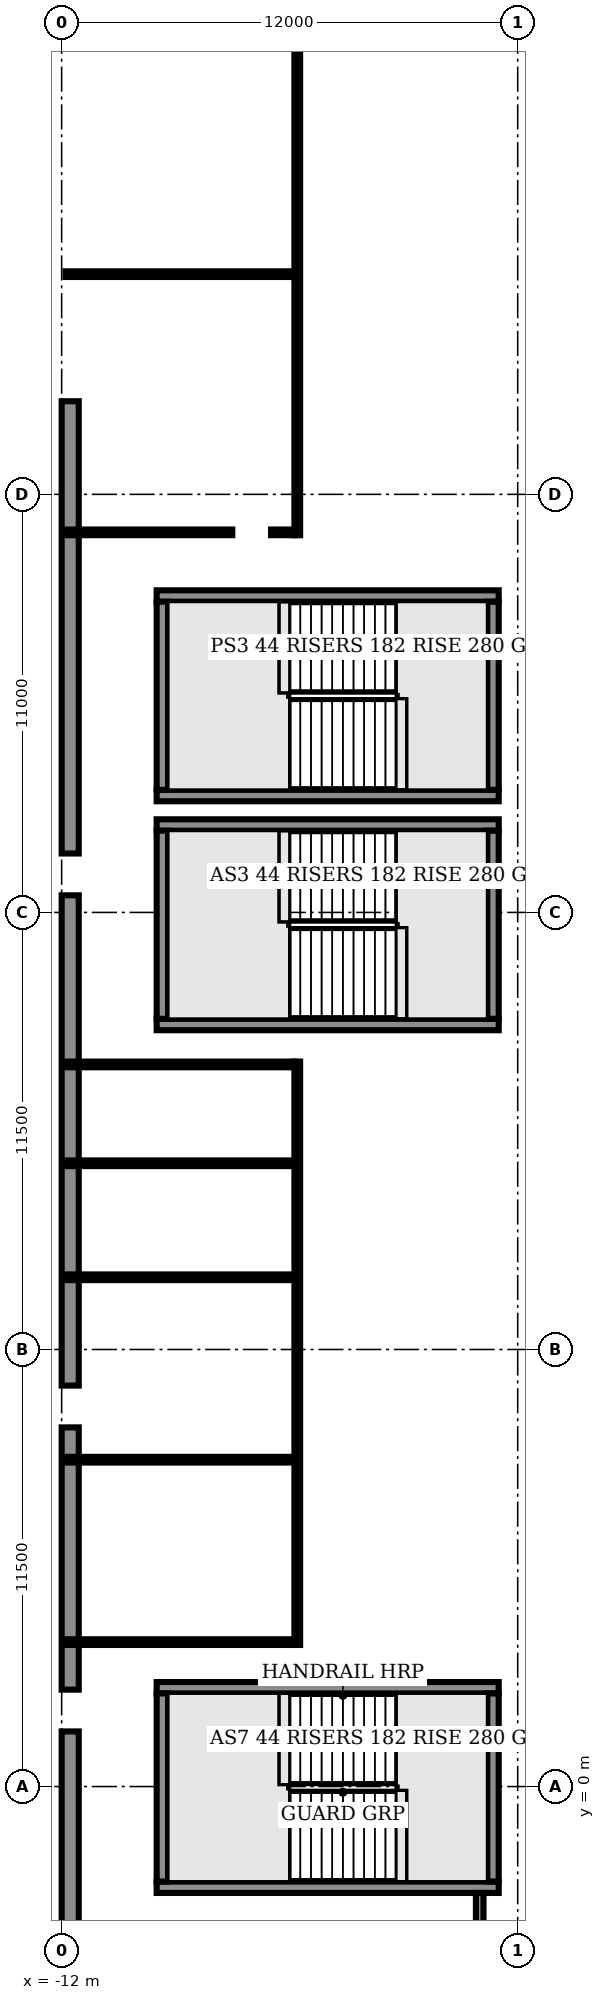
"""IFC4 building model, lengths in metres.
Left out: names, types, materials, properties, quantities, classifications, styles, units other than length and angle.
Written with IfcOpenShell. Run it as: python <this file> out.ifc"""

import sys

from ifc_helpers import new_model, si_unit, direction, frame, frame_2d, origin, origin_2d, place, context, subcontext, project, spatial, rectangle, extrude, element, fill, save


model = new_model("IFC4")
c1 = context("Model", 3, precision=1e-05, world=origin(), true_north=direction((0.0, 1.0)))
c2 = subcontext(c1, "Body", "Model", "MODEL_VIEW")
j1 = project(units=[si_unit("LENGTHUNIT", "METRE"), si_unit("PLANEANGLEUNIT", "RADIAN")], contexts=[c1])
p1 = place(None, origin())
s1 = spatial("IfcSite", under=j1, at=p1, CompositionType="ELEMENT")
p2 = place(p1, origin())
s2 = spatial("IfcBuilding", under=s1, at=p2, CompositionType="ELEMENT")
p3 = place(p2, origin())
s3 = spatial("IfcBuildingStorey", under=s2, at=p3, CompositionType="ELEMENT", Elevation=0.0)
for number, where, z_axis, x_axis in (
    (1, (0.685, 41.034, 0.0), (0.0, 0.0, 1.0), (1.0, 0.0, 0.0)),
    (2, (0.66, 30.0, 0.0), (0.0, 0.0, 1.0), (1.0, 0.0, 0.0)),
    (3, (0.66, 18.0, 0.0), (0.0, 0.0, 1.0), (1.0, 0.0, 0.0)),
):
    element("IfcColumn", number, at=place(p3, frame(where, z_axis=z_axis, x_axis=x_axis)), inside=s3, PredefinedType="COLUMN", context=c2, shape_type="SweptSolid", body=[
        extrude(rectangle(XDim=1.32, YDim=1.32, at=origin_2d()), origin(), (0.0, 0.0, 1.0), 8.0),
    ])
for number, where, z_axis, x_axis in (
    (4, (-11.0, 10.0, 0.0), (0.0, 0.0, 1.0), (1.0, 0.0, 0.0)),
    (5, (-11.0, 24.0, 0.0), (0.0, 0.0, 1.0), (1.0, 0.0, 0.0)),
    (6, (-11.0, 37.0, 0.0), (0.0, 0.0, 1.0), (1.0, 0.0, 0.0)),
    (7, (-11.0, 46.0, 0.0), (0.0, 0.0, 1.0), (1.0, 0.0, 0.0)),
    (8, (-11.0, 2.0, 0.0), (0.0, 0.0, 1.0), (1.0, 0.0, 0.0)),
    (9, (-7.0, 17.0, 0.0), (0.0, 0.0, 1.0), (1.0, 0.0, 0.0)),
    (10, (-7.0, 33.0, 0.0), (0.0, 0.0, 1.0), (1.0, 0.0, 0.0)),
    (11, (-5.0, 6.0, 0.0), (0.0, 0.0, 1.0), (1.0, 0.0, 0.0)),
):
    element("IfcColumn", number, at=place(p3, frame(where, z_axis=z_axis, x_axis=x_axis)), inside=s3, PredefinedType="COLUMN", context=c2, shape_type="SweptSolid", body=[
        extrude(rectangle(XDim=1.0, YDim=1.0, at=origin_2d()), origin(), (0.0, 0.0, 1.0), 8.0),
    ])
p4 = place(p3, frame((-11.775, 45.45, 0.0), z_axis=(0.0, 0.0, 1.0), x_axis=(0.0, -1.0, 0.0)))
e12 = element("IfcWall", 12, at=p4, inside=s3, PredefinedType="SOLIDWALL", context=c2, shape_type="SweptSolid", body=[
    extrude(rectangle(XDim=7.9, YDim=0.45, at=frame_2d((3.95, 0.0))), origin(), (0.0, 0.0, 1.0), 7.7),
])
p5 = place(p3, frame((-11.775, 36.45, 0.0), z_axis=(0.0, 0.0, 1.0), x_axis=(0.0, -1.0, 0.0)))
e13 = element("IfcWall", 13, at=p5, inside=s3, PredefinedType="SOLIDWALL", context=c2, shape_type="SweptSolid", body=[
    extrude(rectangle(XDim=11.9, YDim=0.45, at=frame_2d((5.95, 0.0))), origin(), (0.0, 0.0, 1.0), 7.7),
])
p6 = place(p5, frame((3.85, 0.0, 0.0)))
e14 = element("IfcOpeningElement", 14, at=p6, cuts=e13, PredefinedType="OPENING", context=c2, shape_type="SweptSolid", body=[
    extrude(rectangle(XDim=2.4, YDim=2.4, at=frame_2d((1.2, 1.2))), frame((0.0, 0.235, 0.0), z_axis=(0.0, -1.0, 0.0), x_axis=(1.0, 0.0, 0.0)), (0.0, 0.0, 1.0), 0.47),
])
p7 = place(p5, frame((6.95, 0.0, 0.0)))
e15 = element("IfcOpeningElement", 15, at=p7, cuts=e13, PredefinedType="OPENING", context=c2, shape_type="SweptSolid", body=[
    extrude(rectangle(XDim=2.4, YDim=2.4, at=frame_2d((1.2, 1.2))), frame((0.0, 0.235, 0.0), z_axis=(0.0, -1.0, 0.0), x_axis=(1.0, 0.0, 0.0)), (0.0, 0.0, 1.0), 0.47),
])
p8 = place(p3, frame((-11.775, 23.45, 0.0), z_axis=(0.0, 0.0, 1.0), x_axis=(0.0, -1.0, 0.0)))
e16 = element("IfcWall", 16, at=p8, inside=s3, PredefinedType="SOLIDWALL", context=c2, shape_type="SweptSolid", body=[
    extrude(rectangle(XDim=12.9, YDim=0.45, at=frame_2d((6.45, 0.0))), origin(), (0.0, 0.0, 1.0), 7.7),
])
p9 = place(p8, frame((0.45, 0.0, 0.0)))
e17 = element("IfcOpeningElement", 17, at=p9, cuts=e16, PredefinedType="OPENING", context=c2, shape_type="SweptSolid", body=[
    extrude(rectangle(XDim=2.4, YDim=2.4, at=frame_2d((1.2, 1.2))), frame((0.0, 0.235, 0.0), z_axis=(0.0, -1.0, 0.0), x_axis=(1.0, 0.0, 0.0)), (0.0, 0.0, 1.0), 0.47),
])
p10 = place(p3, frame((-11.775, 9.45, 0.0), z_axis=(0.0, 0.0, 1.0), x_axis=(0.0, -1.0, 0.0)))
e18 = element("IfcWall", 18, at=p10, inside=s3, PredefinedType="SOLIDWALL", context=c2, shape_type="SweptSolid", body=[
    extrude(rectangle(XDim=6.9, YDim=0.45, at=frame_2d((3.45, 0.0))), origin(), (0.0, 0.0, 1.0), 7.7),
])
p11 = place(p3, frame((-11.775, 1.45, 0.0), z_axis=(0.0, 0.0, 1.0), x_axis=(0.0, -1.0, 0.0)))
e19 = element("IfcWall", 19, at=p11, inside=s3, PredefinedType="SOLIDWALL", context=c2, shape_type="SweptSolid", body=[
    extrude(rectangle(XDim=9.9, YDim=0.45, at=frame_2d((4.95, 0.0))), origin(), (0.0, 0.0, 1.0), 7.7),
])
p12 = place(p11, frame((4.8, 0.0, 0.0)))
e20 = element("IfcOpeningElement", 20, at=p12, cuts=e19, PredefinedType="OPENING", context=c2, shape_type="SweptSolid", body=[
    extrude(rectangle(XDim=1.8, YDim=2.4, at=frame_2d((0.9, 1.2))), frame((0.0, 0.235, 0.0), z_axis=(0.0, -1.0, 0.0), x_axis=(1.0, 0.0, 0.0)), (0.0, 0.0, 1.0), 0.47),
])
p13 = place(p11, frame((0.45, 0.0, 0.0)))
e21 = element("IfcOpeningElement", 21, at=p13, cuts=e19, PredefinedType="OPENING", context=c2, shape_type="SweptSolid", body=[
    extrude(rectangle(XDim=2.4, YDim=2.4, at=frame_2d((1.2, 1.2))), frame((0.0, 0.235, 0.0), z_axis=(0.0, -1.0, 0.0), x_axis=(1.0, 0.0, 0.0)), (0.0, 0.0, 1.0), 0.47),
])
p14 = place(p3, frame((-11.895, 3.8, 0.0), z_axis=(0.0, 0.0, 1.0), x_axis=(1.0, 0.0, 0.0)))
e22 = element("IfcWall", 22, at=p14, inside=s3, PredefinedType="PARTITIONING", context=c2, shape_type="SweptSolid", body=[
    extrude(rectangle(XDim=6.02, YDim=0.15, at=frame_2d((3.01, 0.0))), origin(), (0.0, 0.0, 1.0), 7.7),
])
p15 = place(p3, frame((-5.8, 3.725, 0.0), z_axis=(0.0, 0.0, 1.0), x_axis=(0.0, 1.0, 0.0)))
e23 = element("IfcWall", 23, at=p15, inside=s3, PredefinedType="PARTITIONING", context=c2, shape_type="SweptSolid", body=[
    extrude(rectangle(XDim=15.35, YDim=0.15, at=frame_2d((7.675, 0.0))), origin(), (0.0, 0.0, 1.0), 7.7),
])
p16 = place(p15, frame((2.995, 0.0, 0.0)))
e24 = element("IfcOpeningElement", 24, at=p16, cuts=e23, PredefinedType="OPENING", context=c2, shape_type="SweptSolid", body=[
    extrude(rectangle(XDim=1.0, YDim=2.1, at=frame_2d((0.5, 1.05))), frame((0.0, 0.085, 0.0), z_axis=(0.0, -1.0, 0.0), x_axis=(1.0, 0.0, 0.0)), (0.0, 0.0, 1.0), 0.17),
])
p17 = place(p15, frame((6.775, 0.0, 0.0)))
e25 = element("IfcOpeningElement", 25, at=p17, cuts=e23, PredefinedType="OPENING", context=c2, shape_type="SweptSolid", body=[
    extrude(rectangle(XDim=1.0, YDim=2.1, at=frame_2d((0.5, 1.05))), frame((0.0, 0.085, 0.0), z_axis=(0.0, -1.0, 0.0), x_axis=(1.0, 0.0, 0.0)), (0.0, 0.0, 1.0), 0.17),
])
p18 = place(p15, frame((10.675, 0.0, 0.0)))
e26 = element("IfcOpeningElement", 26, at=p18, cuts=e23, PredefinedType="OPENING", context=c2, shape_type="SweptSolid", body=[
    extrude(rectangle(XDim=1.0, YDim=2.1, at=frame_2d((0.5, 1.05))), frame((0.0, 0.085, 0.0), z_axis=(0.0, -1.0, 0.0), x_axis=(1.0, 0.0, 0.0)), (0.0, 0.0, 1.0), 0.17),
])
p19 = place(p15, frame((13.835, 0.0, 0.0)))
e27 = element("IfcOpeningElement", 27, at=p19, cuts=e23, PredefinedType="OPENING", context=c2, shape_type="SweptSolid", body=[
    extrude(rectangle(XDim=1.0, YDim=2.1, at=frame_2d((0.5, 1.05))), frame((0.0, 0.085, 0.0), z_axis=(0.0, -1.0, 0.0), x_axis=(1.0, 0.0, 0.0)), (0.0, 0.0, 1.0), 0.17),
])
p20 = place(p3, frame((-5.8, 32.925, 0.0), z_axis=(0.0, 0.0, 1.0), x_axis=(0.0, 1.0, 0.0)))
e28 = element("IfcWall", 28, at=p20, inside=s3, PredefinedType="PARTITIONING", context=c2, shape_type="SweptSolid", body=[
    extrude(rectangle(XDim=16.65, YDim=0.15, at=frame_2d((8.325, 0.0))), origin(), (0.0, 0.0, 1.0), 7.7),
])
p21 = place(p20, frame((2.972, 0.0, 0.0)))
e29 = element("IfcOpeningElement", 29, at=p21, cuts=e28, PredefinedType="OPENING", context=c2, shape_type="SweptSolid", body=[
    extrude(rectangle(XDim=1.0, YDim=2.1, at=frame_2d((0.5, 1.05))), frame((0.0, 0.085, 0.0), z_axis=(0.0, -1.0, 0.0), x_axis=(1.0, 0.0, 0.0)), (0.0, 0.0, 1.0), 0.17),
])
p22 = place(p20, frame((8.796, 0.0, 0.0)))
e30 = element("IfcOpeningElement", 30, at=p22, cuts=e28, PredefinedType="OPENING", context=c2, shape_type="SweptSolid", body=[
    extrude(rectangle(XDim=1.0, YDim=2.1, at=frame_2d((0.5, 1.05))), frame((0.0, 0.085, 0.0), z_axis=(0.0, -1.0, 0.0), x_axis=(1.0, 0.0, 0.0)), (0.0, 0.0, 1.0), 0.17),
])
p23 = place(p20, frame((13.648, 0.0, 0.0)))
e31 = element("IfcOpeningElement", 31, at=p23, cuts=e28, PredefinedType="OPENING", context=c2, shape_type="SweptSolid", body=[
    extrude(rectangle(XDim=1.0, YDim=2.1, at=frame_2d((0.5, 1.05))), frame((0.0, 0.085, 0.0), z_axis=(0.0, -1.0, 0.0), x_axis=(1.0, 0.0, 0.0)), (0.0, 0.0, 1.0), 0.17),
])
for number, where, z_axis, x_axis in (
    (32, (-11.895, 8.6, 0.0), (0.0, 0.0, 1.0), (1.0, 0.0, 0.0)),
    (33, (-11.895, 13.4, 0.0), (0.0, 0.0, 1.0), (1.0, 0.0, 0.0)),
    (34, (-11.895, 16.4, 0.0), (0.0, 0.0, 1.0), (1.0, 0.0, 0.0)),
    (35, (-11.895, 19.0, 0.0), (0.0, 0.0, 1.0), (1.0, 0.0, 0.0)),
):
    element("IfcWall", number, at=place(p3, frame(where, z_axis=z_axis, x_axis=x_axis)), inside=s3, PredefinedType="PARTITIONING", context=c2, shape_type="SweptSolid", body=[
        extrude(rectangle(XDim=6.02, YDim=0.15, at=frame_2d((3.01, 0.0))), origin(), (0.0, 0.0, 1.0), 7.7),
    ])
p24 = place(p3, frame((-11.895, 33.0, 0.0), z_axis=(0.0, 0.0, 1.0), x_axis=(1.0, 0.0, 0.0)))
e36 = element("IfcWall", 36, at=p24, inside=s3, PredefinedType="PARTITIONING", context=c2, shape_type="SweptSolid", body=[
    extrude(rectangle(XDim=4.385, YDim=0.15, at=frame_2d((2.192, 0.0))), origin(), (0.0, 0.0, 1.0), 7.7),
])
p25 = place(p3, frame((-6.49, 33.0, 0.0), z_axis=(0.0, 0.0, 1.0), x_axis=(1.0, 0.0, 0.0)))
e37 = element("IfcWall", 37, at=p25, inside=s3, PredefinedType="PARTITIONING", context=c2, shape_type="SweptSolid", body=[
    extrude(rectangle(XDim=0.615, YDim=0.15, at=frame_2d((0.308, 0.0))), origin(), (0.0, 0.0, 1.0), 7.7),
])
for number, where, z_axis, x_axis in (
    (38, (-11.895, 39.794, 0.0), (0.0, 0.0, 1.0), (1.0, 0.0, 0.0)),
    (39, (-11.895, 44.647, 0.0), (0.0, 0.0, 1.0), (1.0, 0.0, 0.0)),
):
    element("IfcWall", number, at=place(p3, frame(where, z_axis=z_axis, x_axis=x_axis)), inside=s3, PredefinedType="PARTITIONING", context=c2, shape_type="SweptSolid", body=[
        extrude(rectangle(XDim=6.02, YDim=0.15, at=frame_2d((3.01, 0.0))), origin(), (0.0, 0.0, 1.0), 7.7),
    ])
p26 = place(p3, frame((-9.5, -2.65, 0.0), z_axis=(0.0, 0.0, 1.0), x_axis=(1.0, 0.0, 0.0)))
e40 = element("IfcWall", 40, at=p26, inside=s3, PredefinedType="SHEAR", context=c2, shape_type="SweptSolid", body=[
    extrude(rectangle(XDim=9.0, YDim=0.3, at=frame_2d((4.5, 0.0))), origin(), (0.0, 0.0, 1.0), 7.7),
])
p27 = place(p26, frame((5.9, 0.0, 0.0)))
e41 = element("IfcOpeningElement", 41, at=p27, cuts=e40, PredefinedType="OPENING", context=c2, shape_type="SweptSolid", body=[
    extrude(rectangle(XDim=1.8, YDim=2.1, at=frame_2d((0.9, 1.05))), frame((0.0, 0.16, 0.0), z_axis=(0.0, -1.0, 0.0), x_axis=(1.0, 0.0, 0.0)), (0.0, 0.0, 1.0), 0.32),
])
p28 = place(p3, frame((-9.5, 2.6, 0.0), z_axis=(0.0, 0.0, 1.0), x_axis=(1.0, 0.0, 0.0)))
e42 = element("IfcWall", 42, at=p28, inside=s3, PredefinedType="SHEAR", context=c2, shape_type="SweptSolid", body=[
    extrude(rectangle(XDim=9.0, YDim=0.3, at=frame_2d((4.5, 0.0))), origin(), (0.0, 0.0, 1.0), 7.7),
])
p29 = place(p3, frame((-9.35, -2.5, 0.0), z_axis=(0.0, 0.0, 1.0), x_axis=(0.0, 1.0, 0.0)))
e43 = element("IfcWall", 43, at=p29, inside=s3, PredefinedType="SHEAR", context=c2, shape_type="SweptSolid", body=[
    extrude(rectangle(XDim=4.95, YDim=0.3, at=frame_2d((2.475, 0.0))), origin(), (0.0, 0.0, 1.0), 7.7),
])
p30 = place(p3, frame((-0.65, -2.5, 0.0), z_axis=(0.0, 0.0, 1.0), x_axis=(0.0, 1.0, 0.0)))
e44 = element("IfcWall", 44, at=p30, inside=s3, PredefinedType="SHEAR", context=c2, shape_type="SweptSolid", body=[
    extrude(rectangle(XDim=4.95, YDim=0.3, at=frame_2d((2.475, 0.0))), origin(), (0.0, 0.0, 1.0), 7.7),
])
p31 = place(p30, frame((1.275, 0.0, 0.0)))
e45 = element("IfcOpeningElement", 45, at=p31, cuts=e44, PredefinedType="OPENING", context=c2, shape_type="SweptSolid", body=[
    extrude(rectangle(XDim=2.4, YDim=2.1, at=frame_2d((1.2, 1.05))), frame((0.0, 0.16, 0.0), z_axis=(0.0, -1.0, 0.0), x_axis=(1.0, 0.0, 0.0)), (0.0, 0.0, 1.0), 0.32),
])
for number, where, z_axis, x_axis in (
    (46, (-9.5, 20.05, 0.0), (0.0, 0.0, 1.0), (1.0, 0.0, 0.0)),
    (47, (-9.5, 25.3, 0.0), (0.0, 0.0, 1.0), (1.0, 0.0, 0.0)),
):
    element("IfcWall", number, at=place(p3, frame(where, z_axis=z_axis, x_axis=x_axis)), inside=s3, PredefinedType="SHEAR", context=c2, shape_type="SweptSolid", body=[
        extrude(rectangle(XDim=9.0, YDim=0.3, at=frame_2d((4.5, 0.0))), origin(), (0.0, 0.0, 1.0), 7.7),
    ])
p32 = place(p3, frame((-9.35, 20.2, 0.0), z_axis=(0.0, 0.0, 1.0), x_axis=(0.0, 1.0, 0.0)))
e48 = element("IfcWall", 48, at=p32, inside=s3, PredefinedType="SHEAR", context=c2, shape_type="SweptSolid", body=[
    extrude(rectangle(XDim=4.95, YDim=0.3, at=frame_2d((2.475, 0.0))), origin(), (0.0, 0.0, 1.0), 7.7),
])
p33 = place(p3, frame((-0.65, 20.2, 0.0), z_axis=(0.0, 0.0, 1.0), x_axis=(0.0, 1.0, 0.0)))
e49 = element("IfcWall", 49, at=p33, inside=s3, PredefinedType="SHEAR", context=c2, shape_type="SweptSolid", body=[
    extrude(rectangle(XDim=4.95, YDim=0.3, at=frame_2d((2.475, 0.0))), origin(), (0.0, 0.0, 1.0), 7.7),
])
p34 = place(p33, frame((1.275, 0.0, 0.0)))
e50 = element("IfcOpeningElement", 50, at=p34, cuts=e49, PredefinedType="OPENING", context=c2, shape_type="SweptSolid", body=[
    extrude(rectangle(XDim=2.4, YDim=2.1, at=frame_2d((1.2, 1.05))), frame((0.0, 0.16, 0.0), z_axis=(0.0, -1.0, 0.0), x_axis=(1.0, 0.0, 0.0)), (0.0, 0.0, 1.0), 0.32),
])
for number, where, z_axis, x_axis in (
    (51, (-9.5, 26.075, 0.0), (0.0, 0.0, 1.0), (1.0, 0.0, 0.0)),
    (52, (-9.5, 31.325, 0.0), (0.0, 0.0, 1.0), (1.0, 0.0, 0.0)),
):
    element("IfcWall", number, at=place(p3, frame(where, z_axis=z_axis, x_axis=x_axis)), inside=s3, PredefinedType="SHEAR", context=c2, shape_type="SweptSolid", body=[
        extrude(rectangle(XDim=9.0, YDim=0.3, at=frame_2d((4.5, 0.0))), origin(), (0.0, 0.0, 1.0), 7.7),
    ])
p35 = place(p3, frame((-9.35, 26.225, 0.0), z_axis=(0.0, 0.0, 1.0), x_axis=(0.0, 1.0, 0.0)))
e53 = element("IfcWall", 53, at=p35, inside=s3, PredefinedType="SHEAR", context=c2, shape_type="SweptSolid", body=[
    extrude(rectangle(XDim=4.95, YDim=0.3, at=frame_2d((2.475, 0.0))), origin(), (0.0, 0.0, 1.0), 7.7),
])
p36 = place(p3, frame((-0.65, 26.225, 0.0), z_axis=(0.0, 0.0, 1.0), x_axis=(0.0, 1.0, 0.0)))
e54 = element("IfcWall", 54, at=p36, inside=s3, PredefinedType="SHEAR", context=c2, shape_type="SweptSolid", body=[
    extrude(rectangle(XDim=4.95, YDim=0.3, at=frame_2d((2.475, 0.0))), origin(), (0.0, 0.0, 1.0), 7.7),
])
p37 = place(p36, frame((1.275, 0.0, 0.0)))
e55 = element("IfcOpeningElement", 55, at=p37, cuts=e54, PredefinedType="OPENING", context=c2, shape_type="SweptSolid", body=[
    extrude(rectangle(XDim=2.4, YDim=2.1, at=frame_2d((1.2, 1.05))), frame((0.0, 0.16, 0.0), z_axis=(0.0, -1.0, 0.0), x_axis=(1.0, 0.0, 0.0)), (0.0, 0.0, 1.0), 0.32),
])
p38 = place(p3, frame((-1.0, -5.8, 0.0), z_axis=(0.0, 0.0, 1.0), x_axis=(0.0, 1.0, 0.0)))
e56 = element("IfcWall", 56, at=p38, inside=s3, PredefinedType="PARTITIONING", context=c2, shape_type="SweptSolid", body=[
    extrude(rectangle(XDim=3.0, YDim=0.2, at=frame_2d((1.5, 0.0))), origin(), (0.0, 0.0, 1.0), 7.7),
])
p39 = place(p6, origin())
e57 = element("IfcDoor", 57, at=p39, inside=s3, OperationType="DOUBLE_DOOR_DOUBLE_SWING", PredefinedType="DOOR", context=c2, shape_type="SweptSolid", body=[
    extrude(rectangle(XDim=2.4, YDim=2.4, at=frame_2d((1.2, 1.2))), frame((0.0, 0.025, 0.0), z_axis=(0.0, -1.0, 0.0), x_axis=(1.0, 0.0, 0.0)), (0.0, 0.0, 1.0), 0.05),
])
fill(e14, e57)
p40 = place(p7, origin())
e58 = element("IfcDoor", 58, at=p40, inside=s3, OperationType="DOUBLE_DOOR_DOUBLE_SWING", PredefinedType="DOOR", context=c2, shape_type="SweptSolid", body=[
    extrude(rectangle(XDim=2.4, YDim=2.4, at=frame_2d((1.2, 1.2))), frame((0.0, 0.025, 0.0), z_axis=(0.0, -1.0, 0.0), x_axis=(1.0, 0.0, 0.0)), (0.0, 0.0, 1.0), 0.05),
])
fill(e15, e58)
p41 = place(p9, origin())
e59 = element("IfcDoor", 59, at=p41, inside=s3, OperationType="DOUBLE_DOOR_DOUBLE_SWING", PredefinedType="DOOR", context=c2, shape_type="SweptSolid", body=[
    extrude(rectangle(XDim=2.4, YDim=2.4, at=frame_2d((1.2, 1.2))), frame((0.0, 0.025, 0.0), z_axis=(0.0, -1.0, 0.0), x_axis=(1.0, 0.0, 0.0)), (0.0, 0.0, 1.0), 0.05),
])
fill(e17, e59)
p42 = place(p12, origin())
e60 = element("IfcDoor", 60, at=p42, inside=s3, OperationType="DOUBLE_DOOR_DOUBLE_SWING", PredefinedType="DOOR", context=c2, shape_type="SweptSolid", body=[
    extrude(rectangle(XDim=1.8, YDim=2.4, at=frame_2d((0.9, 1.2))), frame((0.0, 0.025, 0.0), z_axis=(0.0, -1.0, 0.0), x_axis=(1.0, 0.0, 0.0)), (0.0, 0.0, 1.0), 0.05),
])
fill(e20, e60)
p43 = place(p13, origin())
e61 = element("IfcDoor", 61, at=p43, inside=s3, OperationType="DOUBLE_DOOR_DOUBLE_SWING", PredefinedType="DOOR", context=c2, shape_type="SweptSolid", body=[
    extrude(rectangle(XDim=2.4, YDim=2.4, at=frame_2d((1.2, 1.2))), frame((0.0, 0.025, 0.0), z_axis=(0.0, -1.0, 0.0), x_axis=(1.0, 0.0, 0.0)), (0.0, 0.0, 1.0), 0.05),
])
fill(e21, e61)
p44 = place(p16, origin())
e62 = element("IfcDoor", 62, at=p44, inside=s3, OperationType="SINGLE_SWING_RIGHT", PredefinedType="DOOR", context=c2, shape_type="SweptSolid", body=[
    extrude(rectangle(XDim=1.0, YDim=2.1, at=frame_2d((0.5, 1.05))), frame((0.0, 0.025, 0.0), z_axis=(0.0, -1.0, 0.0), x_axis=(1.0, 0.0, 0.0)), (0.0, 0.0, 1.0), 0.05),
])
fill(e24, e62)
p45 = place(p17, origin())
e63 = element("IfcDoor", 63, at=p45, inside=s3, OperationType="SINGLE_SWING_LEFT", PredefinedType="DOOR", context=c2, shape_type="SweptSolid", body=[
    extrude(rectangle(XDim=1.0, YDim=2.1, at=frame_2d((0.5, 1.05))), frame((0.0, 0.025, 0.0), z_axis=(0.0, -1.0, 0.0), x_axis=(1.0, 0.0, 0.0)), (0.0, 0.0, 1.0), 0.05),
])
fill(e25, e63)
p46 = place(p18, origin())
e64 = element("IfcDoor", 64, at=p46, inside=s3, OperationType="SINGLE_SWING_RIGHT", PredefinedType="DOOR", context=c2, shape_type="SweptSolid", body=[
    extrude(rectangle(XDim=1.0, YDim=2.1, at=frame_2d((0.5, 1.05))), frame((0.0, 0.025, 0.0), z_axis=(0.0, -1.0, 0.0), x_axis=(1.0, 0.0, 0.0)), (0.0, 0.0, 1.0), 0.05),
])
fill(e26, e64)
p47 = place(p19, origin())
e65 = element("IfcDoor", 65, at=p47, inside=s3, OperationType="SINGLE_SWING_LEFT", PredefinedType="DOOR", context=c2, shape_type="SweptSolid", body=[
    extrude(rectangle(XDim=1.0, YDim=2.1, at=frame_2d((0.5, 1.05))), frame((0.0, 0.025, 0.0), z_axis=(0.0, -1.0, 0.0), x_axis=(1.0, 0.0, 0.0)), (0.0, 0.0, 1.0), 0.05),
])
fill(e27, e65)
p48 = place(p21, origin())
e66 = element("IfcDoor", 66, at=p48, inside=s3, OperationType="SINGLE_SWING_RIGHT", PredefinedType="DOOR", context=c2, shape_type="SweptSolid", body=[
    extrude(rectangle(XDim=1.0, YDim=2.1, at=frame_2d((0.5, 1.05))), frame((0.0, 0.025, 0.0), z_axis=(0.0, -1.0, 0.0), x_axis=(1.0, 0.0, 0.0)), (0.0, 0.0, 1.0), 0.05),
])
fill(e29, e66)
p49 = place(p22, origin())
e67 = element("IfcDoor", 67, at=p49, inside=s3, OperationType="SINGLE_SWING_LEFT", PredefinedType="DOOR", context=c2, shape_type="SweptSolid", body=[
    extrude(rectangle(XDim=1.0, YDim=2.1, at=frame_2d((0.5, 1.05))), frame((0.0, 0.025, 0.0), z_axis=(0.0, -1.0, 0.0), x_axis=(1.0, 0.0, 0.0)), (0.0, 0.0, 1.0), 0.05),
])
fill(e30, e67)
p50 = place(p31, origin())
e68 = element("IfcDoor", 68, at=p50, inside=s3, OperationType="DOUBLE_DOOR_SINGLE_SWING", PredefinedType="DOOR", context=c2, shape_type="SweptSolid", body=[
    extrude(rectangle(XDim=2.4, YDim=2.1, at=frame_2d((1.2, 1.05))), frame((0.0, 0.025, 0.0), z_axis=(0.0, -1.0, 0.0), x_axis=(1.0, 0.0, 0.0)), (0.0, 0.0, 1.0), 0.05),
])
fill(e45, e68)
p51 = place(p34, origin())
e69 = element("IfcDoor", 69, at=p51, inside=s3, OperationType="DOUBLE_DOOR_SINGLE_SWING", PredefinedType="DOOR", context=c2, shape_type="SweptSolid", body=[
    extrude(rectangle(XDim=2.4, YDim=2.1, at=frame_2d((1.2, 1.05))), frame((0.0, 0.025, 0.0), z_axis=(0.0, -1.0, 0.0), x_axis=(1.0, 0.0, 0.0)), (0.0, 0.0, 1.0), 0.05),
])
fill(e50, e69)
p52 = place(p37, origin())
e70 = element("IfcDoor", 70, at=p52, inside=s3, OperationType="DOUBLE_DOOR_SINGLE_SWING", PredefinedType="DOOR", context=c2, shape_type="SweptSolid", body=[
    extrude(rectangle(XDim=2.4, YDim=2.1, at=frame_2d((1.2, 1.05))), frame((0.0, 0.025, 0.0), z_axis=(0.0, -1.0, 0.0), x_axis=(1.0, 0.0, 0.0)), (0.0, 0.0, 1.0), 0.05),
])
fill(e55, e70)
p53 = place(p27, origin())
e71 = element("IfcDoor", 71, at=p53, inside=s3, OperationType="DOUBLE_DOOR_SINGLE_SWING", PredefinedType="DOOR", context=c2, shape_type="SweptSolid", body=[
    extrude(rectangle(XDim=1.8, YDim=2.1, at=frame_2d((0.9, 1.05))), frame((0.0, 0.025, 0.0), z_axis=(0.0, -1.0, 0.0), x_axis=(1.0, 0.0, 0.0)), (0.0, 0.0, 1.0), 0.05),
])
fill(e41, e71)
save(model, sys.argv[1])
